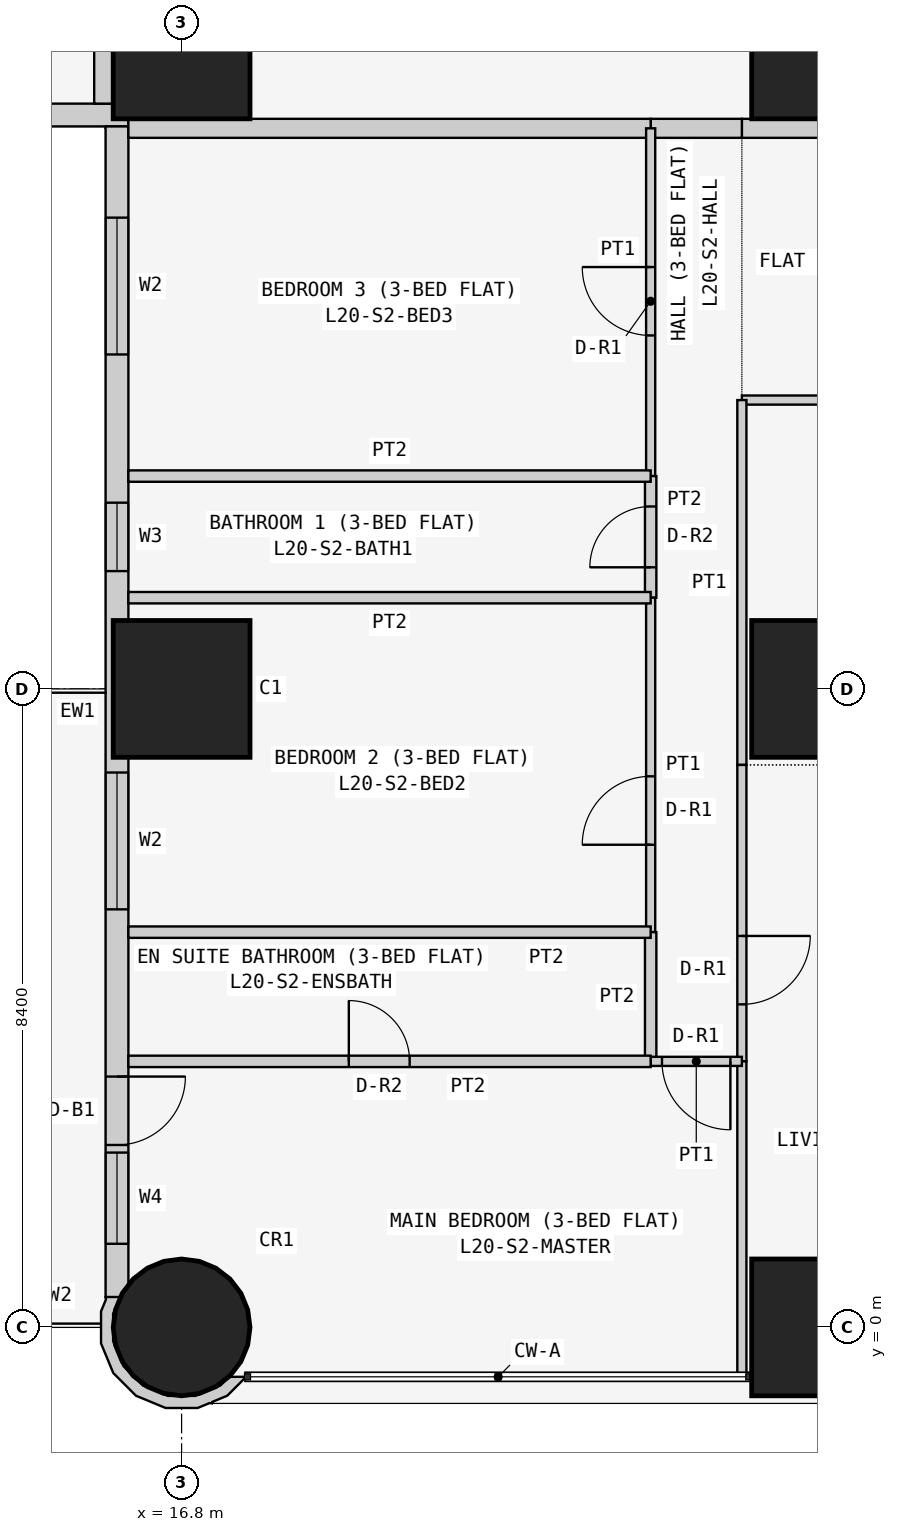
"""IFC4 building model, lengths in metres.
Left out: names, types, materials, properties, quantities, classifications, styles, units other than length and angle.
Written with IfcOpenShell. Run it as: python <this file> out.ifc"""

import sys

from ifc_helpers import new_model, si_unit, direction, frame, frame_2d, origin, origin_2d, place, context, subcontext, project, spatial, polyline, rectangle, circle, outline, extrude, element, fill, save


model = new_model("IFC4")
c1 = context("Model", 3, precision=1e-05, world=origin(), true_north=direction((0.0, 1.0)))
c2 = subcontext(c1, "Body", "Model", "MODEL_VIEW")
j1 = project(units=[si_unit("LENGTHUNIT", "METRE"), si_unit("PLANEANGLEUNIT", "RADIAN")], contexts=[c1])
p1 = place(None, origin())
s1 = spatial("IfcSite", under=j1, at=p1, CompositionType="ELEMENT")
p2 = place(p1, origin())
s2 = spatial("IfcBuilding", under=s1, at=p2, CompositionType="ELEMENT")
p3 = place(p2, frame((0.0, 0.0, 81.3)))
s3 = spatial("IfcBuildingStorey", under=s2, at=p3, CompositionType="ELEMENT", Elevation=81.3)
p4 = place(p3, frame((16.8, 0.0, 0.0), z_axis=(0.0, 0.0, 1.0), x_axis=(1.0, 0.0, 0.0)))
e1 = element("IfcColumn", 1, at=p4, inside=s3, PredefinedType="COLUMN", context=c2, shape_type="SweptSolid", body=[
    extrude(circle(Radius=0.9, at=origin_2d()), origin(), (0.0, 0.0, 1.0), 3.6),
])
for number, where, z_axis, x_axis in (
    (2, (16.8, 8.4, 0.0), (0.0, 0.0, 1.0), (1.0, 0.0, 0.0)),
    (3, (16.8, 16.8, 0.0), (0.0, 0.0, 1.0), (1.0, 0.0, 0.0)),
    (4, (25.2, 0.0, 0.0), (0.0, 0.0, 1.0), (1.0, 0.0, 0.0)),
    (5, (25.2, 8.4, 0.0), (0.0, 0.0, 1.0), (1.0, 0.0, 0.0)),
    (6, (25.2, 16.8, 0.0), (0.0, 0.0, 1.0), (1.0, 0.0, 0.0)),
):
    element("IfcColumn", number, at=place(p3, frame(where, z_axis=z_axis, x_axis=x_axis)), inside=s3, PredefinedType="COLUMN", context=c2, shape_type="SweptSolid", body=[
        extrude(rectangle(XDim=1.8, YDim=1.8, at=origin_2d()), origin(), (0.0, 0.0, 1.0), 3.6),
    ])
p5 = place(p3, frame((0.4, 15.95, 0.0), z_axis=(0.0, 0.0, 1.0), x_axis=(1.0, 0.0, 0.0)))
e7 = element("IfcWall", 7, at=p5, inside=s3, PredefinedType="SOLIDWALL", context=c2, shape_type="SweptSolid", body=[
    extrude(rectangle(XDim=15.7, YDim=0.3, at=frame_2d((7.85, 0.0))), origin(), (0.0, 0.0, 1.0), 3.45),
])
p6 = place(p5, frame((12.4, 0.0, 0.9)))
e8 = element("IfcOpeningElement", 8, at=p6, cuts=e7, PredefinedType="OPENING", context=c2, shape_type="SweptSolid", body=[
    extrude(rectangle(XDim=1.8, YDim=1.5, at=frame_2d((0.9, 0.75))), frame((0.0, 0.16, 0.0), z_axis=(0.0, -1.0, 0.0), x_axis=(1.0, 0.0, 0.0)), (0.0, 0.0, 1.0), 0.32),
])
p7 = place(p5, frame((9.55, 0.0, 1.5)))
e9 = element("IfcOpeningElement", 9, at=p7, cuts=e7, PredefinedType="OPENING", context=c2, shape_type="SweptSolid", body=[
    extrude(rectangle(XDim=0.9, YDim=0.7, at=frame_2d((0.45, 0.35))), frame((0.0, 0.16, 0.0), z_axis=(0.0, -1.0, 0.0), x_axis=(1.0, 0.0, 0.0)), (0.0, 0.0, 1.0), 0.32),
])
p8 = place(p5, frame((5.1, 0.0, 0.9)))
e10 = element("IfcOpeningElement", 10, at=p8, cuts=e7, PredefinedType="OPENING", context=c2, shape_type="SweptSolid", body=[
    extrude(rectangle(XDim=1.8, YDim=1.5, at=frame_2d((0.9, 0.75))), frame((0.0, 0.16, 0.0), z_axis=(0.0, -1.0, 0.0), x_axis=(1.0, 0.0, 0.0)), (0.0, 0.0, 1.0), 0.32),
])
p9 = place(p5, frame((2.0, 0.0, 0.0)))
e11 = element("IfcOpeningElement", 11, at=p9, cuts=e7, PredefinedType="OPENING", context=c2, shape_type="SweptSolid", body=[
    extrude(rectangle(XDim=0.9, YDim=2.4, at=frame_2d((0.45, 1.2))), frame((0.0, 0.16, 0.0), z_axis=(0.0, -1.0, 0.0), x_axis=(1.0, 0.0, 0.0)), (0.0, 0.0, 1.0), 0.32),
])
p10 = place(p5, frame((0.7, 0.0, 0.9)))
e12 = element("IfcOpeningElement", 12, at=p10, cuts=e7, PredefinedType="OPENING", context=c2, shape_type="SweptSolid", body=[
    extrude(rectangle(XDim=1.2, YDim=1.5, at=frame_2d((0.6, 0.75))), frame((0.0, 0.16, 0.0), z_axis=(0.0, -1.0, 0.0), x_axis=(1.0, 0.0, 0.0)), (0.0, 0.0, 1.0), 0.32),
])
p11 = place(p3, frame((15.95, 15.8, 0.0), z_axis=(0.0, 0.0, 1.0), x_axis=(0.0, -1.0, 0.0)))
e13 = element("IfcWall", 13, at=p11, inside=s3, PredefinedType="SOLIDWALL", context=c2, shape_type="SweptSolid", body=[
    extrude(rectangle(XDim=15.4, YDim=0.3, at=frame_2d((7.7, 0.0))), origin(), (0.0, 0.0, 1.0), 3.45),
])
p12 = place(p11, frame((1.2, 0.0, 0.9)))
e14 = element("IfcOpeningElement", 14, at=p12, cuts=e13, PredefinedType="OPENING", context=c2, shape_type="SweptSolid", body=[
    extrude(rectangle(XDim=1.8, YDim=1.5, at=frame_2d((0.9, 0.75))), frame((0.0, 0.16, 0.0), z_axis=(0.0, -1.0, 0.0), x_axis=(1.0, 0.0, 0.0)), (0.0, 0.0, 1.0), 0.32),
])
p13 = place(p11, frame((4.95, 0.0, 1.5)))
e15 = element("IfcOpeningElement", 15, at=p13, cuts=e13, PredefinedType="OPENING", context=c2, shape_type="SweptSolid", body=[
    extrude(rectangle(XDim=0.9, YDim=0.7, at=frame_2d((0.45, 0.35))), frame((0.0, 0.16, 0.0), z_axis=(0.0, -1.0, 0.0), x_axis=(1.0, 0.0, 0.0)), (0.0, 0.0, 1.0), 0.32),
])
p14 = place(p11, frame((8.5, 0.0, 0.9)))
e16 = element("IfcOpeningElement", 16, at=p14, cuts=e13, PredefinedType="OPENING", context=c2, shape_type="SweptSolid", body=[
    extrude(rectangle(XDim=1.8, YDim=1.5, at=frame_2d((0.9, 0.75))), frame((0.0, 0.16, 0.0), z_axis=(0.0, -1.0, 0.0), x_axis=(1.0, 0.0, 0.0)), (0.0, 0.0, 1.0), 0.32),
])
p15 = place(p11, frame((12.5, 0.0, 0.0)))
e17 = element("IfcOpeningElement", 17, at=p15, cuts=e13, PredefinedType="OPENING", context=c2, shape_type="SweptSolid", body=[
    extrude(rectangle(XDim=0.9, YDim=2.4, at=frame_2d((0.45, 1.2))), frame((0.0, 0.16, 0.0), z_axis=(0.0, -1.0, 0.0), x_axis=(1.0, 0.0, 0.0)), (0.0, 0.0, 1.0), 0.32),
])
p16 = place(p11, frame((13.5, 0.0, 0.9)))
e18 = element("IfcOpeningElement", 18, at=p16, cuts=e13, PredefinedType="OPENING", context=c2, shape_type="SweptSolid", body=[
    extrude(rectangle(XDim=1.2, YDim=1.5, at=frame_2d((0.6, 0.75))), frame((0.0, 0.16, 0.0), z_axis=(0.0, -1.0, 0.0), x_axis=(1.0, 0.0, 0.0)), (0.0, 0.0, 1.0), 0.32),
])
p17 = place(p3, frame((15.89, 0.364, 0.0), z_axis=(0.0, 0.0, 1.0), x_axis=(-0.377204953059, -0.926129809145, 0.0)))
e19 = element("IfcWall", 19, at=p17, inside=s3, PredefinedType="SOLIDWALL", context=c2, shape_type="SweptSolid", body=[
    extrude(outline(polyline([(0.36, 1.803), (0.509, 1.741), (0.761, 1.486), (0.896, 1.154), (0.894, 0.795), (0.755, 0.465), (0.5, 0.213), (0.168, 0.078), (-0.1, 0.08), (0.001, -0.097), (0.03, -0.08), (0.199, -0.081), (0.589, 0.078), (0.889, 0.374), (1.053, 0.763), (1.055, 1.185), (0.896, 1.575), (0.778, 1.695), (0.769, 1.728), (0.75, 1.723), (0.6, 1.875), (0.295, 2.004), (0.281, 1.998), (0.36, 1.803)])), origin(), (0.0, 0.0, 1.0), 3.45),
])
p18 = place(p3, frame((29.4, 15.775, 0.0), z_axis=(0.0, 0.0, 1.0), x_axis=(-1.0, 0.0, 0.0)))
e20 = element("IfcWall", 20, at=p18, inside=s3, PredefinedType="PARTITIONING", context=c2, shape_type="SweptSolid", body=[
    extrude(rectangle(XDim=5.229, YDim=0.25, at=frame_2d((2.615, 0.0))), origin(), (0.0, 0.0, 1.0), 3.45),
])
p19 = place(p18, frame((2.1, 0.0, 0.0)))
e21 = element("IfcOpeningElement", 21, at=p19, cuts=e20, PredefinedType="OPENING", context=c2, shape_type="SweptSolid", body=[
    extrude(rectangle(XDim=1.0, YDim=2.1, at=frame_2d((0.5, 1.05))), frame((0.0, 0.135, 0.0), z_axis=(0.0, -1.0, 0.0), x_axis=(1.0, 0.0, 0.0)), (0.0, 0.0, 1.0), 0.27),
])
p20 = place(p3, frame((24.171, 15.775, 0.0), z_axis=(0.0, 0.0, 1.0), x_axis=(-1.0, 0.0, 0.0)))
e22 = element("IfcWall", 22, at=p20, inside=s3, PredefinedType="PARTITIONING", context=c2, shape_type="SweptSolid", body=[
    extrude(rectangle(XDim=1.2, YDim=0.25, at=frame_2d((0.6, 0.0))), origin(), (0.0, 0.0, 1.0), 3.45),
])
p21 = place(p3, frame((22.971, 15.775, 0.0), z_axis=(0.0, 0.0, 1.0), x_axis=(-1.0, 0.0, 0.0)))
e23 = element("IfcWall", 23, at=p21, inside=s3, PredefinedType="PARTITIONING", context=c2, shape_type="SweptSolid", body=[
    extrude(rectangle(XDim=6.871, YDim=0.25, at=frame_2d((3.436, 0.0))), origin(), (0.0, 0.0, 1.0), 3.45),
])
p22 = place(p3, frame((15.775, 16.1, 0.0), z_axis=(0.0, 0.0, 1.0), x_axis=(0.0, 1.0, 0.0)))
e24 = element("IfcWall", 24, at=p22, inside=s3, PredefinedType="PARTITIONING", context=c2, shape_type="SweptSolid", body=[
    extrude(rectangle(XDim=6.471, YDim=0.25, at=frame_2d((3.235, 0.0))), origin(), (0.0, 0.0, 1.0), 3.45),
])
p23 = place(p3, frame((29.4, 12.2, 0.0), z_axis=(0.0, 0.0, 1.0), x_axis=(-1.0, 0.0, 0.0)))
e25 = element("IfcWall", 25, at=p23, inside=s3, PredefinedType="PARTITIONING", context=c2, shape_type="SweptSolid", body=[
    extrude(rectangle(XDim=5.229, YDim=0.12, at=frame_2d((2.615, 0.0))), origin(), (0.0, 0.0, 1.0), 3.45),
])
p24 = place(p23, frame((1.05, 0.0, 0.0)))
e26 = element("IfcOpeningElement", 26, at=p24, cuts=e25, PredefinedType="OPENING", context=c2, shape_type="SweptSolid", body=[
    extrude(rectangle(XDim=0.9, YDim=2.1, at=frame_2d((0.45, 1.05))), frame((0.0, 0.07, 0.0), z_axis=(0.0, -1.0, 0.0), x_axis=(1.0, 0.0, 0.0)), (0.0, 0.0, 1.0), 0.14),
])
p25 = place(p3, frame((24.171, 7.4, 0.0), z_axis=(0.0, 0.0, 1.0), x_axis=(0.0, 1.0, 0.0)))
e27 = element("IfcWall", 27, at=p25, inside=s3, PredefinedType="PARTITIONING", context=c2, shape_type="SweptSolid", body=[
    extrude(rectangle(XDim=4.8, YDim=0.12, at=frame_2d((2.4, 0.0))), origin(), (0.0, 0.0, 1.0), 3.45),
])
p26 = place(p3, frame((24.171, 3.5, 0.0), z_axis=(0.0, 0.0, 1.0), x_axis=(0.0, 1.0, 0.0)))
e28 = element("IfcWall", 28, at=p26, inside=s3, PredefinedType="PARTITIONING", context=c2, shape_type="SweptSolid", body=[
    extrude(rectangle(XDim=3.9, YDim=0.12, at=frame_2d((1.95, 0.0))), origin(), (0.0, 0.0, 1.0), 3.45),
])
p27 = place(p26, frame((0.75, 0.0, 0.0)))
e29 = element("IfcOpeningElement", 29, at=p27, cuts=e28, PredefinedType="OPENING", context=c2, shape_type="SweptSolid", body=[
    extrude(rectangle(XDim=0.9, YDim=2.1, at=frame_2d((0.45, 1.05))), frame((0.0, 0.07, 0.0), z_axis=(0.0, -1.0, 0.0), x_axis=(1.0, 0.0, 0.0)), (0.0, 0.0, 1.0), 0.14),
])
p28 = place(p3, frame((24.171, -0.65, 0.0), z_axis=(0.0, 0.0, 1.0), x_axis=(0.0, 1.0, 0.0)))
e30 = element("IfcWall", 30, at=p28, inside=s3, PredefinedType="PARTITIONING", context=c2, shape_type="SweptSolid", body=[
    extrude(rectangle(XDim=4.15, YDim=0.12, at=frame_2d((2.075, 0.0))), origin(), (0.0, 0.0, 1.0), 3.45),
])
p29 = place(p3, frame((22.971, 11.2, 0.0), z_axis=(0.0, 0.0, 1.0), x_axis=(0.0, 1.0, 0.0)))
e31 = element("IfcWall", 31, at=p29, inside=s3, PredefinedType="PARTITIONING", context=c2, shape_type="SweptSolid", body=[
    extrude(rectangle(XDim=4.575, YDim=0.12, at=frame_2d((2.288, 0.0))), origin(), (0.0, 0.0, 1.0), 3.45),
])
p30 = place(p29, frame((1.85, 0.0, 0.0)))
e32 = element("IfcOpeningElement", 32, at=p30, cuts=e31, PredefinedType="OPENING", context=c2, shape_type="SweptSolid", body=[
    extrude(rectangle(XDim=0.9, YDim=2.1, at=frame_2d((0.45, 1.05))), frame((0.0, 0.07, 0.0), z_axis=(0.0, -1.0, 0.0), x_axis=(1.0, 0.0, 0.0)), (0.0, 0.0, 1.0), 0.14),
])
p31 = place(p3, frame((22.971, 9.6, 0.0), z_axis=(0.0, 0.0, 1.0), x_axis=(0.0, 1.0, 0.0)))
e33 = element("IfcWall", 33, at=p31, inside=s3, PredefinedType="PARTITIONING", context=c2, shape_type="SweptSolid", body=[
    extrude(rectangle(XDim=1.6, YDim=0.15, at=frame_2d((0.8, 0.0))), origin(), (0.0, 0.0, 1.0), 3.45),
])
p32 = place(p31, frame((0.4, 0.0, 0.0)))
e34 = element("IfcOpeningElement", 34, at=p32, cuts=e33, PredefinedType="OPENING", context=c2, shape_type="SweptSolid", body=[
    extrude(rectangle(XDim=0.8, YDim=2.1, at=frame_2d((0.4, 1.05))), frame((0.0, 0.085, 0.0), z_axis=(0.0, -1.0, 0.0), x_axis=(1.0, 0.0, 0.0)), (0.0, 0.0, 1.0), 0.17),
])
p33 = place(p3, frame((22.971, 5.2, 0.0), z_axis=(0.0, 0.0, 1.0), x_axis=(0.0, 1.0, 0.0)))
e35 = element("IfcWall", 35, at=p33, inside=s3, PredefinedType="PARTITIONING", context=c2, shape_type="SweptSolid", body=[
    extrude(rectangle(XDim=4.4, YDim=0.12, at=frame_2d((2.2, 0.0))), origin(), (0.0, 0.0, 1.0), 3.45),
])
p34 = place(p33, frame((1.15, 0.0, 0.0)))
e36 = element("IfcOpeningElement", 36, at=p34, cuts=e35, PredefinedType="OPENING", context=c2, shape_type="SweptSolid", body=[
    extrude(rectangle(XDim=0.9, YDim=2.1, at=frame_2d((0.45, 1.05))), frame((0.0, 0.07, 0.0), z_axis=(0.0, -1.0, 0.0), x_axis=(1.0, 0.0, 0.0)), (0.0, 0.0, 1.0), 0.14),
])
p35 = place(p3, frame((22.971, 3.5, 0.0), z_axis=(0.0, 0.0, 1.0), x_axis=(0.0, 1.0, 0.0)))
e37 = element("IfcWall", 37, at=p35, inside=s3, PredefinedType="PARTITIONING", context=c2, shape_type="SweptSolid", body=[
    extrude(rectangle(XDim=1.7, YDim=0.15, at=frame_2d((0.85, 0.0))), origin(), (0.0, 0.0, 1.0), 3.45),
])
p36 = place(p3, frame((24.171, 3.5, 0.0), z_axis=(0.0, 0.0, 1.0), x_axis=(-1.0, 0.0, 0.0)))
e38 = element("IfcWall", 38, at=p36, inside=s3, PredefinedType="PARTITIONING", context=c2, shape_type="SweptSolid", body=[
    extrude(rectangle(XDim=1.2, YDim=0.12, at=frame_2d((0.6, 0.0))), origin(), (0.0, 0.0, 1.0), 3.45),
])
p37 = place(p36, frame((0.151, 0.0, 0.0)))
e39 = element("IfcOpeningElement", 39, at=p37, cuts=e38, PredefinedType="OPENING", context=c2, shape_type="SweptSolid", body=[
    extrude(rectangle(XDim=0.9, YDim=2.1, at=frame_2d((0.45, 1.05))), frame((0.0, 0.07, 0.0), z_axis=(0.0, -1.0, 0.0), x_axis=(1.0, 0.0, 0.0)), (0.0, 0.0, 1.0), 0.14),
])
for number, where, z_axis, x_axis in (
    (40, (22.971, 11.2, 0.0), (0.0, 0.0, 1.0), (-1.0, 0.0, 0.0)),
    (41, (22.971, 9.6, 0.0), (0.0, 0.0, 1.0), (-1.0, 0.0, 0.0)),
    (42, (22.971, 5.2, 0.0), (0.0, 0.0, 1.0), (-1.0, 0.0, 0.0)),
):
    element("IfcWall", number, at=place(p3, frame(where, z_axis=z_axis, x_axis=x_axis)), inside=s3, PredefinedType="PARTITIONING", context=c2, shape_type="SweptSolid", body=[
        extrude(rectangle(XDim=6.871, YDim=0.15, at=frame_2d((3.436, 0.0))), origin(), (0.0, 0.0, 1.0), 3.45),
    ])
p38 = place(p3, frame((22.971, 3.5, 0.0), z_axis=(0.0, 0.0, 1.0), x_axis=(-1.0, 0.0, 0.0)))
e43 = element("IfcWall", 43, at=p38, inside=s3, PredefinedType="PARTITIONING", context=c2, shape_type="SweptSolid", body=[
    extrude(rectangle(XDim=6.871, YDim=0.15, at=frame_2d((3.436, 0.0))), origin(), (0.0, 0.0, 1.0), 3.45),
])
p39 = place(p38, frame((3.171, 0.0, 0.0)))
e44 = element("IfcOpeningElement", 44, at=p39, cuts=e43, PredefinedType="OPENING", context=c2, shape_type="SweptSolid", body=[
    extrude(rectangle(XDim=0.8, YDim=2.1, at=frame_2d((0.4, 1.05))), frame((0.0, 0.085, 0.0), z_axis=(0.0, -1.0, 0.0), x_axis=(1.0, 0.0, 0.0)), (0.0, 0.0, 1.0), 0.17),
])
p40 = place(p12, origin())
e45 = element("IfcWindow", 45, at=p40, inside=s3, PartitioningType="SINGLE_PANEL", PredefinedType="WINDOW", context=c2, shape_type="SweptSolid", body=[
    extrude(rectangle(XDim=1.8, YDim=1.5, at=frame_2d((0.9, 0.75))), frame((0.0, 0.03, 0.0), z_axis=(0.0, -1.0, 0.0), x_axis=(1.0, 0.0, 0.0)), (0.0, 0.0, 1.0), 0.06),
])
fill(e14, e45)
p41 = place(p13, origin())
e46 = element("IfcWindow", 46, at=p41, inside=s3, PartitioningType="SINGLE_PANEL", PredefinedType="WINDOW", context=c2, shape_type="SweptSolid", body=[
    extrude(rectangle(XDim=0.9, YDim=0.7, at=frame_2d((0.45, 0.35))), frame((0.0, 0.03, 0.0), z_axis=(0.0, -1.0, 0.0), x_axis=(1.0, 0.0, 0.0)), (0.0, 0.0, 1.0), 0.06),
])
fill(e15, e46)
p42 = place(p14, origin())
e47 = element("IfcWindow", 47, at=p42, inside=s3, PartitioningType="SINGLE_PANEL", PredefinedType="WINDOW", context=c2, shape_type="SweptSolid", body=[
    extrude(rectangle(XDim=1.8, YDim=1.5, at=frame_2d((0.9, 0.75))), frame((0.0, 0.03, 0.0), z_axis=(0.0, -1.0, 0.0), x_axis=(1.0, 0.0, 0.0)), (0.0, 0.0, 1.0), 0.06),
])
fill(e16, e47)
p43 = place(p15, origin())
e48 = element("IfcDoor", 48, at=p43, inside=s3, OperationType="SINGLE_SWING_LEFT", PredefinedType="DOOR", context=c2, shape_type="SweptSolid", body=[
    extrude(rectangle(XDim=0.9, YDim=2.4, at=frame_2d((0.45, 1.2))), frame((0.0, 0.025, 0.0), z_axis=(0.0, -1.0, 0.0), x_axis=(1.0, 0.0, 0.0)), (0.0, 0.0, 1.0), 0.05),
])
fill(e17, e48)
p44 = place(p16, origin())
e49 = element("IfcWindow", 49, at=p44, inside=s3, PartitioningType="SINGLE_PANEL", PredefinedType="WINDOW", context=c2, shape_type="SweptSolid", body=[
    extrude(rectangle(XDim=1.2, YDim=1.5, at=frame_2d((0.6, 0.75))), frame((0.0, 0.03, 0.0), z_axis=(0.0, -1.0, 0.0), x_axis=(1.0, 0.0, 0.0)), (0.0, 0.0, 1.0), 0.06),
])
fill(e18, e49)
p45 = place(p27, frame((0.9, 0.0, 0.0), z_axis=(0.0, 0.0, 1.0), x_axis=(-1.0, 0.0, 0.0)))
e50 = element("IfcDoor", 50, at=p45, inside=s3, OperationType="SINGLE_SWING_LEFT", PredefinedType="DOOR", context=c2, shape_type="SweptSolid", body=[
    extrude(rectangle(XDim=0.9, YDim=2.1, at=frame_2d((0.45, 1.05))), frame((0.0, 0.025, 0.0), z_axis=(0.0, -1.0, 0.0), x_axis=(1.0, 0.0, 0.0)), (0.0, 0.0, 1.0), 0.05),
])
fill(e29, e50)
p46 = place(p30, origin())
e51 = element("IfcDoor", 51, at=p46, inside=s3, OperationType="SINGLE_SWING_RIGHT", PredefinedType="DOOR", context=c2, shape_type="SweptSolid", body=[
    extrude(rectangle(XDim=0.9, YDim=2.1, at=frame_2d((0.45, 1.05))), frame((0.0, 0.025, 0.0), z_axis=(0.0, -1.0, 0.0), x_axis=(1.0, 0.0, 0.0)), (0.0, 0.0, 1.0), 0.05),
])
fill(e32, e51)
p47 = place(p32, origin())
e52 = element("IfcDoor", 52, at=p47, inside=s3, OperationType="SINGLE_SWING_LEFT", PredefinedType="DOOR", context=c2, shape_type="SweptSolid", body=[
    extrude(rectangle(XDim=0.8, YDim=2.1, at=frame_2d((0.4, 1.05))), frame((0.0, 0.025, 0.0), z_axis=(0.0, -1.0, 0.0), x_axis=(1.0, 0.0, 0.0)), (0.0, 0.0, 1.0), 0.05),
])
fill(e34, e52)
p48 = place(p34, origin())
e53 = element("IfcDoor", 53, at=p48, inside=s3, OperationType="SINGLE_SWING_LEFT", PredefinedType="DOOR", context=c2, shape_type="SweptSolid", body=[
    extrude(rectangle(XDim=0.9, YDim=2.1, at=frame_2d((0.45, 1.05))), frame((0.0, 0.025, 0.0), z_axis=(0.0, -1.0, 0.0), x_axis=(1.0, 0.0, 0.0)), (0.0, 0.0, 1.0), 0.05),
])
fill(e36, e53)
p49 = place(p37, origin())
e54 = element("IfcDoor", 54, at=p49, inside=s3, OperationType="SINGLE_SWING_LEFT", PredefinedType="DOOR", context=c2, shape_type="SweptSolid", body=[
    extrude(rectangle(XDim=0.9, YDim=2.1, at=frame_2d((0.45, 1.05))), frame((0.0, 0.025, 0.0), z_axis=(0.0, -1.0, 0.0), x_axis=(1.0, 0.0, 0.0)), (0.0, 0.0, 1.0), 0.05),
])
fill(e39, e54)
p50 = place(p39, frame((0.8, 0.0, 0.0), z_axis=(0.0, 0.0, 1.0), x_axis=(-1.0, 0.0, 0.0)))
e55 = element("IfcDoor", 55, at=p50, inside=s3, OperationType="SINGLE_SWING_LEFT", PredefinedType="DOOR", context=c2, shape_type="SweptSolid", body=[
    extrude(rectangle(XDim=0.8, YDim=2.1, at=frame_2d((0.4, 1.05))), frame((0.0, 0.025, 0.0), z_axis=(0.0, -1.0, 0.0), x_axis=(1.0, 0.0, 0.0)), (0.0, 0.0, 1.0), 0.05),
])
fill(e44, e55)
save(model, sys.argv[1])
